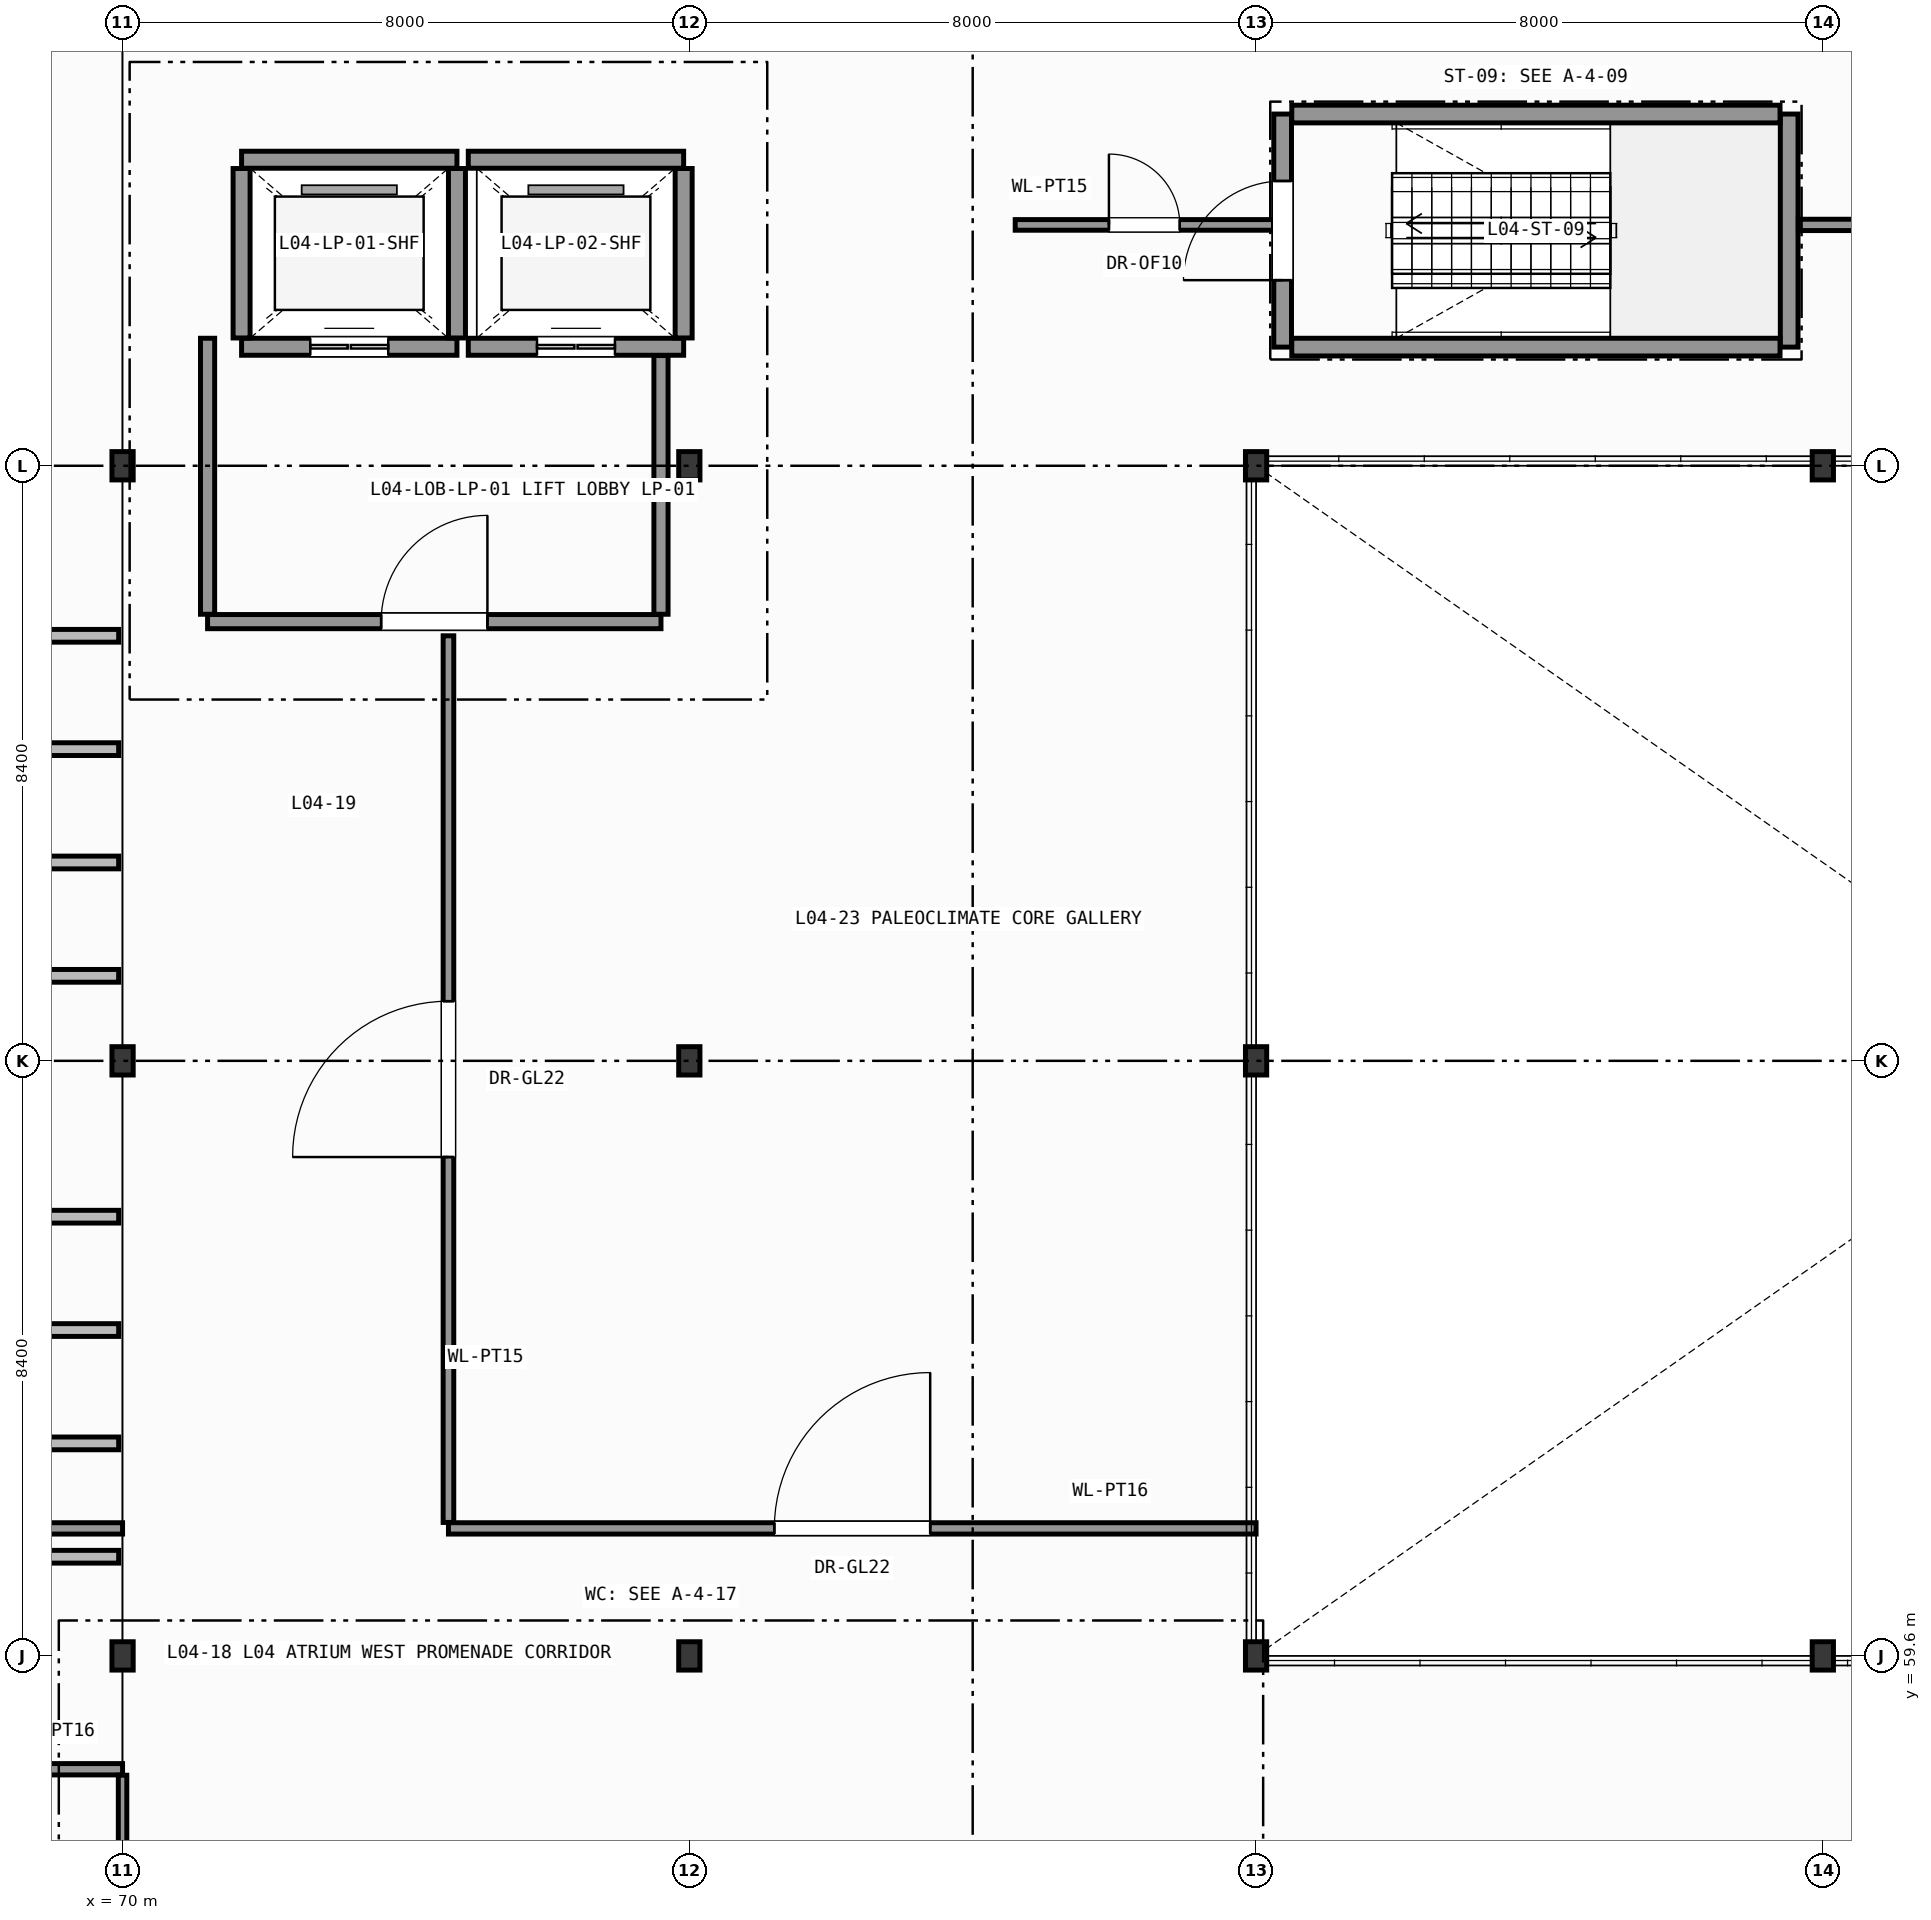
"""IFC4 building model, lengths in metres.
Left out: names, types, materials, properties, quantities, classifications, styles, units other than length and angle.
Written with IfcOpenShell. Run it as: python <this file> out.ifc"""

import sys

from ifc_helpers import new_model, si_unit, direction, frame, frame_2d, origin, origin_2d, place, context, subcontext, project, spatial, rectangle, i_section, extrude, element, fill, save


model = new_model("IFC4")
c1 = context("Model", 3, precision=1e-05, world=origin(), true_north=direction((0.0, 1.0)))
c2 = subcontext(c1, "Body", "Model", "MODEL_VIEW")
j1 = project(units=[si_unit("LENGTHUNIT", "METRE"), si_unit("PLANEANGLEUNIT", "RADIAN")], contexts=[c1])
p1 = place(None, origin())
s1 = spatial("IfcSite", under=j1, at=p1, CompositionType="ELEMENT")
p2 = place(p1, origin())
s2 = spatial("IfcBuilding", under=s1, at=p2, CompositionType="ELEMENT")
p3 = place(p2, frame((0.0, 0.0, 18.0)))
s3 = spatial("IfcBuildingStorey", under=s2, at=p3, CompositionType="ELEMENT", Elevation=18.0)
for number, where, z_axis, x_axis in (
    (1, (70.0, 59.6, 0.0), (0.0, 0.0, 1.0), (1.0, 0.0, 0.0)),
    (2, (70.0, 68.0, 0.0), (0.0, 0.0, 1.0), (1.0, 0.0, 0.0)),
    (3, (70.0, 76.4, 0.0), (0.0, 0.0, 1.0), (1.0, 0.0, 0.0)),
    (4, (78.0, 59.6, 0.0), (0.0, 0.0, 1.0), (1.0, 0.0, 0.0)),
    (5, (78.0, 68.0, 0.0), (0.0, 0.0, 1.0), (1.0, 0.0, 0.0)),
    (6, (78.0, 76.4, 0.0), (0.0, 0.0, 1.0), (1.0, 0.0, 0.0)),
    (7, (86.0, 59.6, 0.0), (0.0, 0.0, 1.0), (1.0, 0.0, 0.0)),
    (8, (86.0, 68.0, 0.0), (0.0, 0.0, 1.0), (1.0, 0.0, 0.0)),
    (9, (86.0, 76.4, 0.0), (0.0, 0.0, 1.0), (1.0, 0.0, 0.0)),
    (10, (94.0, 59.6, 0.0), (0.0, 0.0, 1.0), (1.0, 0.0, 0.0)),
    (11, (94.0, 76.4, 0.0), (0.0, 0.0, 1.0), (1.0, 0.0, 0.0)),
):
    element("IfcColumn", number, at=place(p3, frame(where, z_axis=z_axis, x_axis=x_axis)), inside=s3, PredefinedType="COLUMN", context=c2, shape_type="SweptSolid", body=[
        extrude(i_section(OverallWidth=0.3, OverallDepth=0.4, WebThickness=0.013, FlangeThickness=0.024, FilletRadius=0.027, at=origin_2d()), origin(), (0.0, 0.0, 1.0), 4.2),
    ])
p4 = place(p3, frame((86.375, 78.075, 0.0), z_axis=(0.0, 0.0, 1.0), x_axis=(0.0, 1.0, 0.0)))
e12 = element("IfcWall", 12, at=p4, inside=s3, PredefinedType="SHEAR", context=c2, shape_type="SweptSolid", body=[
    extrude(rectangle(XDim=3.29, YDim=0.25, at=frame_2d((1.645, 0.0))), origin(), (0.0, 0.0, 1.0), 3.98),
])
p5 = place(p4, frame((0.945, 0.0, 0.0)))
e13 = element("IfcOpeningElement", 13, at=p5, cuts=e12, PredefinedType="OPENING", context=c2, shape_type="SweptSolid", body=[
    extrude(rectangle(XDim=1.4, YDim=2.2, at=frame_2d((0.7, 1.1))), frame((0.0, 0.135, 0.0), z_axis=(0.0, -1.0, 0.0), x_axis=(1.0, 0.0, 0.0)), (0.0, 0.0, 1.0), 0.27),
])
p6 = place(p3, frame((93.525, 78.075, 0.0), z_axis=(0.0, 0.0, 1.0), x_axis=(0.0, 1.0, 0.0)))
e14 = element("IfcWall", 14, at=p6, inside=s3, PredefinedType="SHEAR", context=c2, shape_type="SweptSolid", body=[
    extrude(rectangle(XDim=3.29, YDim=0.25, at=frame_2d((1.645, 0.0))), origin(), (0.0, 0.0, 1.0), 3.98),
])
for number, where, z_axis, x_axis in (
    (15, (86.504, 78.075, 0.0), (0.0, 0.0, 1.0), (1.0, 0.0, 0.0)),
    (16, (86.504, 81.365, 0.0), (0.0, 0.0, 1.0), (1.0, 0.0, 0.0)),
):
    element("IfcWall", number, at=place(p3, frame(where, z_axis=z_axis, x_axis=x_axis)), inside=s3, PredefinedType="SHEAR", context=c2, shape_type="SweptSolid", body=[
        extrude(rectangle(XDim=6.892, YDim=0.25, at=frame_2d((3.446, 0.0))), origin(), (0.0, 0.0, 1.0), 3.98),
    ])
p7 = place(p3, frame((71.68, 78.08, 0.0), z_axis=(0.0, 0.0, 1.0), x_axis=(1.0, 0.0, 0.0)))
e17 = element("IfcWall", 17, at=p7, inside=s3, PredefinedType="SHEAR", context=c2, shape_type="SweptSolid", body=[
    extrude(rectangle(XDim=3.04, YDim=0.24, at=frame_2d((1.52, 0.0))), origin(), (0.0, 0.0, 1.0), 3.98),
])
p8 = place(p7, frame((0.97, 0.0, 0.0)))
e18 = element("IfcOpeningElement", 18, at=p8, cuts=e17, PredefinedType="OPENING", context=c2, shape_type="SweptSolid", body=[
    extrude(rectangle(XDim=1.1, YDim=2.2, at=frame_2d((0.55, 1.1))), frame((0.0, 0.13, 0.0), z_axis=(0.0, -1.0, 0.0), x_axis=(1.0, 0.0, 0.0)), (0.0, 0.0, 1.0), 0.26),
])
p9 = place(p3, frame((71.68, 80.72, 0.0), z_axis=(0.0, 0.0, 1.0), x_axis=(1.0, 0.0, 0.0)))
e19 = element("IfcWall", 19, at=p9, inside=s3, PredefinedType="SHEAR", context=c2, shape_type="SweptSolid", body=[
    extrude(rectangle(XDim=3.04, YDim=0.24, at=frame_2d((1.52, 0.0))), origin(), (0.0, 0.0, 1.0), 3.98),
])
for number, where, z_axis, x_axis in (
    (20, (71.68, 78.204, 0.0), (0.0, 0.0, 1.0), (0.0, 1.0, 0.0)),
    (21, (74.72, 78.204, 0.0), (0.0, 0.0, 1.0), (0.0, 1.0, 0.0)),
):
    element("IfcWall", number, at=place(p3, frame(where, z_axis=z_axis, x_axis=x_axis)), inside=s3, PredefinedType="SHEAR", context=c2, shape_type="SweptSolid", body=[
        extrude(rectangle(XDim=2.392, YDim=0.24, at=frame_2d((1.196, 0.0))), origin(), (0.0, 0.0, 1.0), 3.98),
    ])
p10 = place(p3, frame((74.88, 78.08, 0.0), z_axis=(0.0, 0.0, 1.0), x_axis=(1.0, 0.0, 0.0)))
e22 = element("IfcWall", 22, at=p10, inside=s3, PredefinedType="SHEAR", context=c2, shape_type="SweptSolid", body=[
    extrude(rectangle(XDim=3.04, YDim=0.24, at=frame_2d((1.52, 0.0))), origin(), (0.0, 0.0, 1.0), 3.98),
])
p11 = place(p10, frame((0.97, 0.0, 0.0)))
e23 = element("IfcOpeningElement", 23, at=p11, cuts=e22, PredefinedType="OPENING", context=c2, shape_type="SweptSolid", body=[
    extrude(rectangle(XDim=1.1, YDim=2.2, at=frame_2d((0.55, 1.1))), frame((0.0, 0.13, 0.0), z_axis=(0.0, -1.0, 0.0), x_axis=(1.0, 0.0, 0.0)), (0.0, 0.0, 1.0), 0.26),
])
p12 = place(p3, frame((74.88, 80.72, 0.0), z_axis=(0.0, 0.0, 1.0), x_axis=(1.0, 0.0, 0.0)))
e24 = element("IfcWall", 24, at=p12, inside=s3, PredefinedType="SHEAR", context=c2, shape_type="SweptSolid", body=[
    extrude(rectangle(XDim=3.04, YDim=0.24, at=frame_2d((1.52, 0.0))), origin(), (0.0, 0.0, 1.0), 3.98),
])
p13 = place(p3, frame((77.92, 78.204, 0.0), z_axis=(0.0, 0.0, 1.0), x_axis=(0.0, 1.0, 0.0)))
e25 = element("IfcWall", 25, at=p13, inside=s3, PredefinedType="SHEAR", context=c2, shape_type="SweptSolid", body=[
    extrude(rectangle(XDim=2.392, YDim=0.24, at=frame_2d((1.196, 0.0))), origin(), (0.0, 0.0, 1.0), 3.98),
])
p14 = place(p3, frame((71.2, 74.2, 0.0), z_axis=(0.0, 0.0, 1.0), x_axis=(1.0, 0.0, 0.0)))
e26 = element("IfcWall", 26, at=p14, inside=s3, PredefinedType="PARTITIONING", context=c2, shape_type="SweptSolid", body=[
    extrude(rectangle(XDim=6.4, YDim=0.2, at=frame_2d((3.2, 0.0))), origin(), (0.0, 0.0, 1.0), 3.98),
])
p15 = place(p14, frame((2.45, 0.0, 0.0)))
e27 = element("IfcOpeningElement", 27, at=p15, cuts=e26, PredefinedType="OPENING", context=c2, shape_type="SweptSolid", body=[
    extrude(rectangle(XDim=1.5, YDim=2.2, at=frame_2d((0.75, 1.1))), frame((0.0, 0.11, 0.0), z_axis=(0.0, -1.0, 0.0), x_axis=(1.0, 0.0, 0.0)), (0.0, 0.0, 1.0), 0.22),
])
p16 = place(p3, frame((71.2, 74.304, 0.0), z_axis=(0.0, 0.0, 1.0), x_axis=(0.0, 1.0, 0.0)))
e28 = element("IfcWall", 28, at=p16, inside=s3, PredefinedType="PARTITIONING", context=c2, shape_type="SweptSolid", body=[
    extrude(rectangle(XDim=3.896, YDim=0.2, at=frame_2d((1.948, 0.0))), origin(), (0.0, 0.0, 1.0), 3.98),
])
p17 = place(p3, frame((77.6, 74.304, 0.0), z_axis=(0.0, 0.0, 1.0), x_axis=(0.0, 1.0, 0.0)))
e29 = element("IfcWall", 29, at=p17, inside=s3, PredefinedType="PARTITIONING", context=c2, shape_type="SweptSolid", body=[
    extrude(rectangle(XDim=3.652, YDim=0.2, at=frame_2d((1.826, 0.0))), origin(), (0.0, 0.0, 1.0), 3.98),
])
p18 = place(p3, frame((43.6, 61.4, 0.0), z_axis=(0.0, 0.0, 1.0), x_axis=(1.0, 0.0, 0.0)))
e30 = element("IfcWall", 30, at=p18, inside=s3, PredefinedType="PARTITIONING", context=c2, shape_type="SweptSolid", body=[
    extrude(rectangle(XDim=26.4, YDim=0.16, at=frame_2d((13.2, 0.0))), origin(), (0.0, 0.0, 1.0), 3.98),
])
p19 = place(p18, frame((12.1, 0.0, 0.0)))
e31 = element("IfcOpeningElement", 31, at=p19, cuts=e30, PredefinedType="OPENING", context=c2, shape_type="SweptSolid", body=[
    extrude(rectangle(XDim=2.2, YDim=2.6, at=frame_2d((1.1, 1.3))), frame((0.0, 0.09, 0.0), z_axis=(0.0, -1.0, 0.0), x_axis=(1.0, 0.0, 0.0)), (0.0, 0.0, 1.0), 0.18),
])
p20 = place(p3, frame((64.6, 58.0, 0.0), z_axis=(0.0, 0.0, 1.0), x_axis=(1.0, 0.0, 0.0)))
e32 = element("IfcWall", 32, at=p20, inside=s3, PredefinedType="PARTITIONING", context=c2, shape_type="SweptSolid", body=[
    extrude(rectangle(XDim=5.4, YDim=0.16, at=frame_2d((2.7, 0.0))), origin(), (0.0, 0.0, 1.0), 3.98),
])
p21 = place(p20, frame((2.225, 0.0, 0.0)))
e33 = element("IfcOpeningElement", 33, at=p21, cuts=e32, PredefinedType="OPENING", context=c2, shape_type="SweptSolid", body=[
    extrude(rectangle(XDim=0.95, YDim=2.1, at=frame_2d((0.475, 1.05))), frame((0.0, 0.09, 0.0), z_axis=(0.0, -1.0, 0.0), x_axis=(1.0, 0.0, 0.0)), (0.0, 0.0, 1.0), 0.18),
])
p22 = place(p3, frame((70.0, 52.754, 0.0), z_axis=(0.0, 0.0, 1.0), x_axis=(0.0, 1.0, 0.0)))
e34 = element("IfcWall", 34, at=p22, inside=s3, PredefinedType="PARTITIONING", context=c2, shape_type="SweptSolid", body=[
    extrude(rectangle(XDim=5.162, YDim=0.12, at=frame_2d((2.581, 0.0))), origin(), (0.0, 0.0, 1.0), 3.525),
])
p23 = place(p22, frame((2.081, 0.0, 0.0)))
e35 = element("IfcOpeningElement", 35, at=p23, cuts=e34, PredefinedType="OPENING", context=c2, shape_type="SweptSolid", body=[
    extrude(rectangle(XDim=1.0, YDim=2.15, at=frame_2d((0.5, 1.075))), frame((0.0, 0.07, 0.0), z_axis=(0.0, -1.0, 0.0), x_axis=(1.0, 0.0, 0.0)), (0.0, 0.0, 1.0), 0.14),
])
p24 = place(p3, frame((74.6, 61.4, 0.0), z_axis=(0.0, 0.0, 1.0), x_axis=(1.0, 0.0, 0.0)))
e36 = element("IfcWall", 36, at=p24, inside=s3, PredefinedType="PARTITIONING", context=c2, shape_type="SweptSolid", body=[
    extrude(rectangle(XDim=11.4, YDim=0.16, at=frame_2d((5.7, 0.0))), origin(), (0.0, 0.0, 1.0), 3.98),
])
p25 = place(p24, frame((4.6, 0.0, 0.0)))
e37 = element("IfcOpeningElement", 37, at=p25, cuts=e36, PredefinedType="OPENING", context=c2, shape_type="SweptSolid", body=[
    extrude(rectangle(XDim=2.2, YDim=2.6, at=frame_2d((1.1, 1.3))), frame((0.0, 0.09, 0.0), z_axis=(0.0, -1.0, 0.0), x_axis=(1.0, 0.0, 0.0)), (0.0, 0.0, 1.0), 0.18),
])
p26 = place(p3, frame((74.6, 61.484, 0.0), z_axis=(0.0, 0.0, 1.0), x_axis=(0.0, 1.0, 0.0)))
e38 = element("IfcWall", 38, at=p26, inside=s3, PredefinedType="PARTITIONING", context=c2, shape_type="SweptSolid", body=[
    extrude(rectangle(XDim=12.516, YDim=0.15, at=frame_2d((6.258, 0.0))), origin(), (0.0, 0.0, 1.0), 3.98),
])
p27 = place(p26, frame((5.158, 0.0, 0.0)))
e39 = element("IfcOpeningElement", 39, at=p27, cuts=e38, PredefinedType="OPENING", context=c2, shape_type="SweptSolid", body=[
    extrude(rectangle(XDim=2.2, YDim=2.6, at=frame_2d((1.1, 1.3))), frame((0.0, 0.085, 0.0), z_axis=(0.0, -1.0, 0.0), x_axis=(1.0, 0.0, 0.0)), (0.0, 0.0, 1.0), 0.17),
])
p28 = place(p3, frame((93.654, 79.8, 0.0), z_axis=(0.0, 0.0, 1.0), x_axis=(1.0, 0.0, 0.0)))
e40 = element("IfcWall", 40, at=p28, inside=s3, PredefinedType="PARTITIONING", context=c2, shape_type="SweptSolid", body=[
    extrude(rectangle(XDim=19.746, YDim=0.16, at=frame_2d((9.873, 0.0))), origin(), (0.0, 0.0, 1.0), 3.605),
])
p29 = place(p28, frame((8.773, 0.0, 0.0)))
e41 = element("IfcOpeningElement", 41, at=p29, cuts=e40, PredefinedType="OPENING", context=c2, shape_type="SweptSolid", body=[
    extrude(rectangle(XDim=2.2, YDim=2.6, at=frame_2d((1.1, 1.3))), frame((0.0, 0.09, 0.0), z_axis=(0.0, -1.0, 0.0), x_axis=(1.0, 0.0, 0.0)), (0.0, 0.0, 1.0), 0.18),
])
p30 = place(p3, frame((82.6, 79.8, 0.0), z_axis=(0.0, 0.0, 1.0), x_axis=(1.0, 0.0, 0.0)))
e42 = element("IfcWall", 42, at=p30, inside=s3, PredefinedType="PARTITIONING", context=c2, shape_type="SweptSolid", body=[
    extrude(rectangle(XDim=3.646, YDim=0.15, at=frame_2d((1.823, 0.0))), origin(), (0.0, 0.0, 1.0), 3.635),
])
p31 = place(p30, frame((1.323, 0.0, 0.0)))
e43 = element("IfcOpeningElement", 43, at=p31, cuts=e42, PredefinedType="OPENING", context=c2, shape_type="SweptSolid", body=[
    extrude(rectangle(XDim=1.0, YDim=2.15, at=frame_2d((0.5, 1.075))), frame((0.0, 0.085, 0.0), z_axis=(0.0, -1.0, 0.0), x_axis=(1.0, 0.0, 0.0)), (0.0, 0.0, 1.0), 0.17),
])
p32 = place(p5, origin())
e44 = element("IfcDoor", 44, at=p32, inside=s3, OperationType="SINGLE_SWING_LEFT", PredefinedType="DOOR", context=c2, shape_type="SweptSolid", body=[
    extrude(rectangle(XDim=1.4, YDim=2.2, at=frame_2d((0.7, 1.1))), frame((0.0, 0.025, 0.0), z_axis=(0.0, -1.0, 0.0), x_axis=(1.0, 0.0, 0.0)), (0.0, 0.0, 1.0), 0.05),
])
fill(e13, e44)
p33 = place(p8, origin())
e45 = element("IfcDoor", 45, at=p33, inside=s3, OperationType="DOUBLE_DOOR_SLIDING", PredefinedType="DOOR", context=c2, shape_type="SweptSolid", body=[
    extrude(rectangle(XDim=1.1, YDim=2.2, at=frame_2d((0.55, 1.1))), frame((0.0, 0.025, 0.0), z_axis=(0.0, -1.0, 0.0), x_axis=(1.0, 0.0, 0.0)), (0.0, 0.0, 1.0), 0.05),
])
fill(e18, e45)
p34 = place(p11, origin())
e46 = element("IfcDoor", 46, at=p34, inside=s3, OperationType="DOUBLE_DOOR_SLIDING", PredefinedType="DOOR", context=c2, shape_type="SweptSolid", body=[
    extrude(rectangle(XDim=1.1, YDim=2.2, at=frame_2d((0.55, 1.1))), frame((0.0, 0.025, 0.0), z_axis=(0.0, -1.0, 0.0), x_axis=(1.0, 0.0, 0.0)), (0.0, 0.0, 1.0), 0.05),
])
fill(e23, e46)
p35 = place(p15, origin())
e47 = element("IfcDoor", 47, at=p35, inside=s3, OperationType="SINGLE_SWING_RIGHT", PredefinedType="DOOR", context=c2, shape_type="SweptSolid", body=[
    extrude(rectangle(XDim=1.5, YDim=2.2, at=frame_2d((0.75, 1.1))), frame((0.0, 0.025, 0.0), z_axis=(0.0, -1.0, 0.0), x_axis=(1.0, 0.0, 0.0)), (0.0, 0.0, 1.0), 0.05),
])
fill(e27, e47)
p36 = place(p25, origin())
e48 = element("IfcDoor", 48, at=p36, inside=s3, OperationType="SINGLE_SWING_RIGHT", PredefinedType="DOOR", context=c2, shape_type="SweptSolid", body=[
    extrude(rectangle(XDim=2.2, YDim=2.6, at=frame_2d((1.1, 1.3))), frame((0.0, 0.025, 0.0), z_axis=(0.0, -1.0, 0.0), x_axis=(1.0, 0.0, 0.0)), (0.0, 0.0, 1.0), 0.05),
])
fill(e37, e48)
p37 = place(p27, origin())
e49 = element("IfcDoor", 49, at=p37, inside=s3, OperationType="SINGLE_SWING_LEFT", PredefinedType="DOOR", context=c2, shape_type="SweptSolid", body=[
    extrude(rectangle(XDim=2.2, YDim=2.6, at=frame_2d((1.1, 1.3))), frame((0.0, 0.025, 0.0), z_axis=(0.0, -1.0, 0.0), x_axis=(1.0, 0.0, 0.0)), (0.0, 0.0, 1.0), 0.05),
])
fill(e39, e49)
p38 = place(p31, origin())
e50 = element("IfcDoor", 50, at=p38, inside=s3, OperationType="SINGLE_SWING_LEFT", PredefinedType="DOOR", context=c2, shape_type="SweptSolid", body=[
    extrude(rectangle(XDim=1.0, YDim=2.15, at=frame_2d((0.5, 1.075))), frame((0.0, 0.025, 0.0), z_axis=(0.0, -1.0, 0.0), x_axis=(1.0, 0.0, 0.0)), (0.0, 0.0, 1.0), 0.05),
])
fill(e43, e50)
save(model, sys.argv[1])
